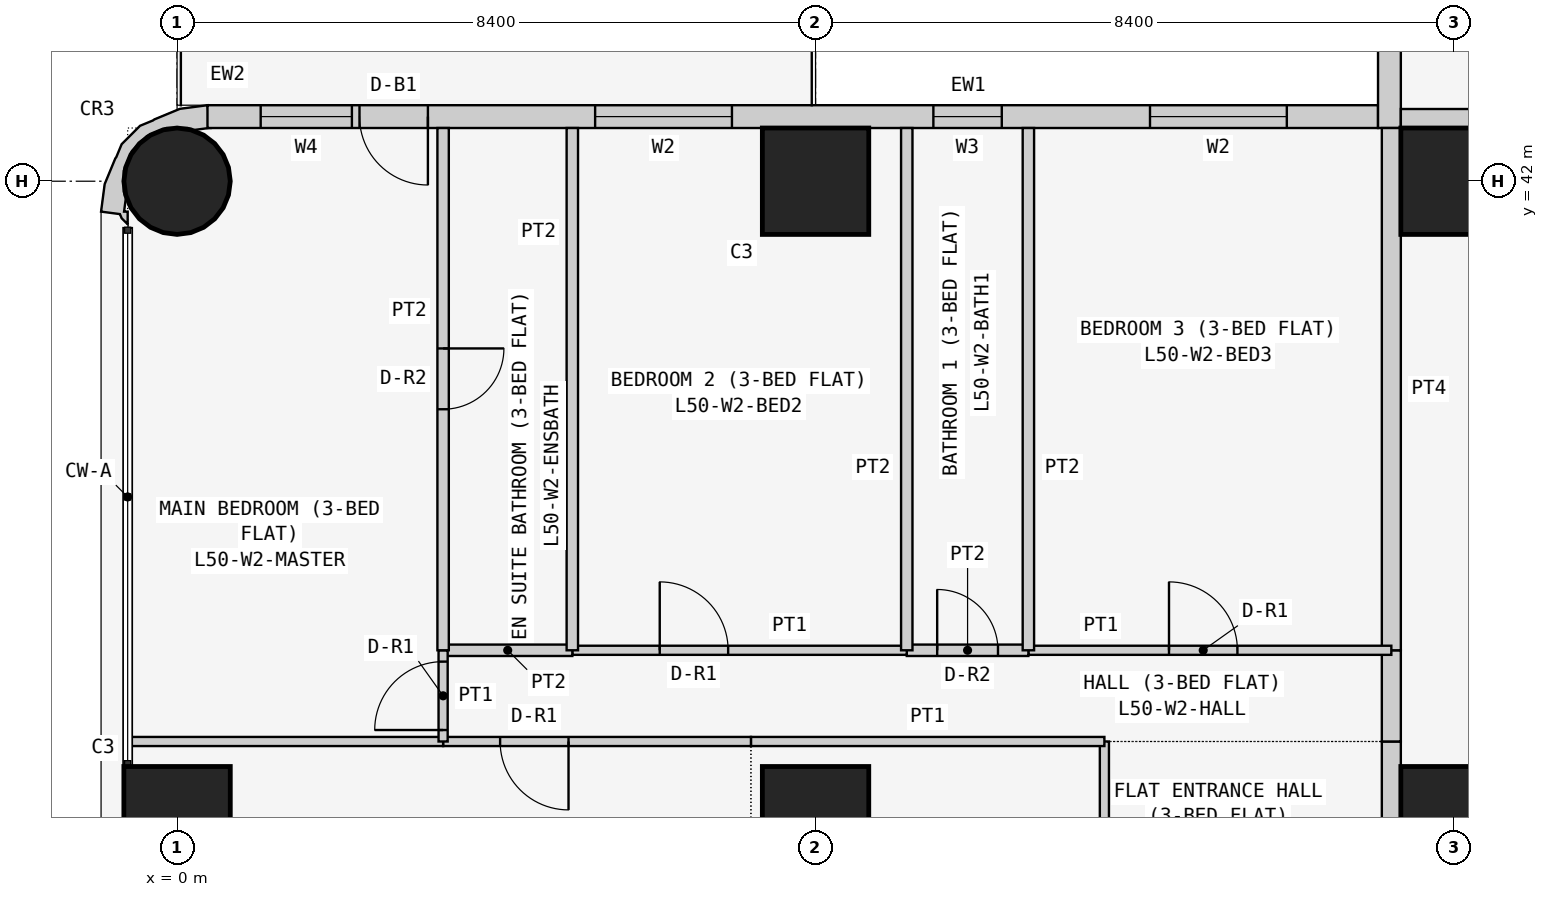
"""IFC4 building model, lengths in metres.
Left out: names, types, materials, properties, quantities, classifications, styles, units other than length and angle.
Written with IfcOpenShell. Run it as: python <this file> out.ifc"""

import sys

from ifc_helpers import new_model, si_unit, direction, frame, frame_2d, origin, origin_2d, place, context, subcontext, project, spatial, polyline, rectangle, circle, outline, extrude, element, fill, save


model = new_model("IFC4")
c1 = context("Model", 3, precision=1e-05, world=origin(), true_north=direction((0.0, 1.0)))
c2 = subcontext(c1, "Body", "Model", "MODEL_VIEW")
j1 = project(units=[si_unit("LENGTHUNIT", "METRE"), si_unit("PLANEANGLEUNIT", "RADIAN")], contexts=[c1])
p1 = place(None, origin())
s1 = spatial("IfcSite", under=j1, at=p1, CompositionType="ELEMENT")
p2 = place(p1, origin())
s2 = spatial("IfcBuilding", under=s1, at=p2, CompositionType="ELEMENT")
p3 = place(p2, frame((0.0, 0.0, 194.1)))
s3 = spatial("IfcBuildingStorey", under=s2, at=p3, CompositionType="ELEMENT", Elevation=194.1)
p4 = place(p3, frame((0.0, 33.6, 0.0), z_axis=(0.0, 0.0, 1.0), x_axis=(1.0, 0.0, 0.0)))
e1 = element("IfcColumn", 1, at=p4, inside=s3, PredefinedType="COLUMN", context=c2, shape_type="SweptSolid", body=[
    extrude(rectangle(XDim=1.4, YDim=1.4, at=origin_2d()), origin(), (0.0, 0.0, 1.0), 3.6),
])
p5 = place(p3, frame((0.0, 42.0, 0.0), z_axis=(0.0, 0.0, 1.0), x_axis=(1.0, 0.0, 0.0)))
e2 = element("IfcColumn", 2, at=p5, inside=s3, PredefinedType="COLUMN", context=c2, shape_type="SweptSolid", body=[
    extrude(circle(Radius=0.7, at=origin_2d()), origin(), (0.0, 0.0, 1.0), 3.6),
])
for number, where, z_axis, x_axis in (
    (3, (8.4, 33.6, 0.0), (0.0, 0.0, 1.0), (1.0, 0.0, 0.0)),
    (4, (8.4, 42.0, 0.0), (0.0, 0.0, 1.0), (1.0, 0.0, 0.0)),
    (5, (16.8, 33.6, 0.0), (0.0, 0.0, 1.0), (1.0, 0.0, 0.0)),
    (6, (16.8, 42.0, 0.0), (0.0, 0.0, 1.0), (1.0, 0.0, 0.0)),
):
    element("IfcColumn", number, at=place(p3, frame(where, z_axis=z_axis, x_axis=x_axis)), inside=s3, PredefinedType="COLUMN", context=c2, shape_type="SweptSolid", body=[
        extrude(rectangle(XDim=1.4, YDim=1.4, at=origin_2d()), origin(), (0.0, 0.0, 1.0), 3.6),
    ])
p6 = place(p3, frame((15.8, 42.85, 0.0), z_axis=(0.0, 0.0, 1.0), x_axis=(-1.0, 0.0, 0.0)))
e7 = element("IfcWall", 7, at=p6, inside=s3, PredefinedType="SOLIDWALL", context=c2, shape_type="SweptSolid", body=[
    extrude(rectangle(XDim=15.4, YDim=0.3, at=frame_2d((7.7, 0.0))), origin(), (0.0, 0.0, 1.0), 3.45),
])
p7 = place(p6, frame((1.2, 0.0, 0.9)))
e8 = element("IfcOpeningElement", 8, at=p7, cuts=e7, PredefinedType="OPENING", context=c2, shape_type="SweptSolid", body=[
    extrude(rectangle(XDim=1.8, YDim=1.5, at=frame_2d((0.9, 0.75))), frame((0.0, 0.16, 0.0), z_axis=(0.0, -1.0, 0.0), x_axis=(1.0, 0.0, 0.0)), (0.0, 0.0, 1.0), 0.32),
])
p8 = place(p6, frame((4.95, 0.0, 1.5)))
e9 = element("IfcOpeningElement", 9, at=p8, cuts=e7, PredefinedType="OPENING", context=c2, shape_type="SweptSolid", body=[
    extrude(rectangle(XDim=0.9, YDim=0.7, at=frame_2d((0.45, 0.35))), frame((0.0, 0.16, 0.0), z_axis=(0.0, -1.0, 0.0), x_axis=(1.0, 0.0, 0.0)), (0.0, 0.0, 1.0), 0.32),
])
p9 = place(p6, frame((8.5, 0.0, 0.9)))
e10 = element("IfcOpeningElement", 10, at=p9, cuts=e7, PredefinedType="OPENING", context=c2, shape_type="SweptSolid", body=[
    extrude(rectangle(XDim=1.8, YDim=1.5, at=frame_2d((0.9, 0.75))), frame((0.0, 0.16, 0.0), z_axis=(0.0, -1.0, 0.0), x_axis=(1.0, 0.0, 0.0)), (0.0, 0.0, 1.0), 0.32),
])
p10 = place(p6, frame((12.5, 0.0, 0.0)))
e11 = element("IfcOpeningElement", 11, at=p10, cuts=e7, PredefinedType="OPENING", context=c2, shape_type="SweptSolid", body=[
    extrude(rectangle(XDim=0.9, YDim=2.4, at=frame_2d((0.45, 1.2))), frame((0.0, 0.16, 0.0), z_axis=(0.0, -1.0, 0.0), x_axis=(1.0, 0.0, 0.0)), (0.0, 0.0, 1.0), 0.32),
])
p11 = place(p6, frame((13.5, 0.0, 0.9)))
e12 = element("IfcOpeningElement", 12, at=p11, cuts=e7, PredefinedType="OPENING", context=c2, shape_type="SweptSolid", body=[
    extrude(rectangle(XDim=1.2, YDim=1.5, at=frame_2d((0.6, 0.75))), frame((0.0, 0.16, 0.0), z_axis=(0.0, -1.0, 0.0), x_axis=(1.0, 0.0, 0.0)), (0.0, 0.0, 1.0), 0.32),
])
p12 = place(p3, frame((15.95, 50.0, 0.0), z_axis=(0.0, 0.0, 1.0), x_axis=(0.0, -1.0, 0.0)))
e13 = element("IfcWall", 13, at=p12, inside=s3, PredefinedType="SOLIDWALL", context=c2, shape_type="SweptSolid", body=[
    extrude(rectangle(XDim=7.3, YDim=0.3, at=frame_2d((3.65, 0.0))), origin(), (0.0, 0.0, 1.0), 3.45),
])
p13 = place(p12, frame((3.1, 0.0, 0.9)))
e14 = element("IfcOpeningElement", 14, at=p13, cuts=e13, PredefinedType="OPENING", context=c2, shape_type="SweptSolid", body=[
    extrude(rectangle(XDim=2.4, YDim=1.5, at=frame_2d((1.2, 0.75))), frame((0.0, 0.16, 0.0), z_axis=(0.0, -1.0, 0.0), x_axis=(1.0, 0.0, 0.0)), (0.0, 0.0, 1.0), 0.32),
])
p14 = place(p12, frame((0.75, 0.0, 0.9)))
e15 = element("IfcOpeningElement", 15, at=p14, cuts=e13, PredefinedType="OPENING", context=c2, shape_type="SweptSolid", body=[
    extrude(rectangle(XDim=1.2, YDim=1.5, at=frame_2d((0.6, 0.75))), frame((0.0, 0.16, 0.0), z_axis=(0.0, -1.0, 0.0), x_axis=(1.0, 0.0, 0.0)), (0.0, 0.0, 1.0), 0.32),
])
p15 = place(p3, frame((0.29, 42.724, 0.0), z_axis=(0.0, 0.0, 1.0), x_axis=(-0.898030234854, 0.439933741929, 0.0)))
e16 = element("IfcWall", 16, at=p15, inside=s3, PredefinedType="SOLIDWALL", context=c2, shape_type="SweptSolid", body=[
    extrude(outline(polyline([(-0.145, -0.044), (0.022, -0.296), (0.327, -0.094), (0.568, 0.18), (0.578, 0.199), (0.7, 0.338), (0.811, 0.661), (0.799, 0.846), (0.803, 0.866), (0.78, 1.231), (0.664, 1.577), (0.426, 1.497), (0.382, 1.536), (0.276, 1.572), (0.349, 1.423), (0.392, 1.444), (0.453, 1.261), (0.51, 1.211), (0.632, 0.961), (0.65, 0.683), (0.56, 0.419), (0.375, 0.21), (0.125, 0.087), (0.05, 0.082), (-0.127, -0.035), (-0.145, -0.044)])), origin(), (0.0, 0.0, 1.0), 3.45),
])
p16 = place(p3, frame((16.1, 42.825, 0.0), z_axis=(0.0, 0.0, 1.0), x_axis=(1.0, 0.0, 0.0)))
e17 = element("IfcWall", 17, at=p16, inside=s3, PredefinedType="PARTITIONING", context=c2, shape_type="SweptSolid", body=[
    extrude(rectangle(XDim=6.871, YDim=0.25, at=frame_2d((3.436, 0.0))), origin(), (0.0, 0.0, 1.0), 3.45),
])
p17 = place(p3, frame((15.975, 29.4, 0.0), z_axis=(0.0, 0.0, 1.0), x_axis=(0.0, 1.0, 0.0)))
e18 = element("IfcWall", 18, at=p17, inside=s3, PredefinedType="PARTITIONING", context=c2, shape_type="SweptSolid", body=[
    extrude(rectangle(XDim=5.229, YDim=0.25, at=frame_2d((2.615, 0.0))), origin(), (0.0, 0.0, 1.0), 3.45),
])
p18 = place(p17, frame((2.1, 0.0, 0.0)))
e19 = element("IfcOpeningElement", 19, at=p18, cuts=e18, PredefinedType="OPENING", context=c2, shape_type="SweptSolid", body=[
    extrude(rectangle(XDim=1.0, YDim=2.1, at=frame_2d((0.5, 1.05))), frame((0.0, 0.135, 0.0), z_axis=(0.0, -1.0, 0.0), x_axis=(1.0, 0.0, 0.0)), (0.0, 0.0, 1.0), 0.27),
])
p19 = place(p3, frame((15.975, 34.629, 0.0), z_axis=(0.0, 0.0, 1.0), x_axis=(0.0, 1.0, 0.0)))
e20 = element("IfcWall", 20, at=p19, inside=s3, PredefinedType="PARTITIONING", context=c2, shape_type="SweptSolid", body=[
    extrude(rectangle(XDim=1.2, YDim=0.25, at=frame_2d((0.6, 0.0))), origin(), (0.0, 0.0, 1.0), 3.45),
])
p20 = place(p3, frame((15.975, 35.829, 0.0), z_axis=(0.0, 0.0, 1.0), x_axis=(0.0, 1.0, 0.0)))
e21 = element("IfcWall", 21, at=p20, inside=s3, PredefinedType="PARTITIONING", context=c2, shape_type="SweptSolid", body=[
    extrude(rectangle(XDim=6.871, YDim=0.25, at=frame_2d((3.436, 0.0))), origin(), (0.0, 0.0, 1.0), 3.45),
])
p21 = place(p3, frame((12.2, 29.4, 0.0), z_axis=(0.0, 0.0, 1.0), x_axis=(0.0, 1.0, 0.0)))
e22 = element("IfcWall", 22, at=p21, inside=s3, PredefinedType="PARTITIONING", context=c2, shape_type="SweptSolid", body=[
    extrude(rectangle(XDim=5.229, YDim=0.12, at=frame_2d((2.615, 0.0))), origin(), (0.0, 0.0, 1.0), 3.45),
])
p22 = place(p21, frame((1.05, 0.0, 0.0)))
e23 = element("IfcOpeningElement", 23, at=p22, cuts=e22, PredefinedType="OPENING", context=c2, shape_type="SweptSolid", body=[
    extrude(rectangle(XDim=0.9, YDim=2.1, at=frame_2d((0.45, 1.05))), frame((0.0, 0.07, 0.0), z_axis=(0.0, -1.0, 0.0), x_axis=(1.0, 0.0, 0.0)), (0.0, 0.0, 1.0), 0.14),
])
p23 = place(p3, frame((7.55, 34.629, 0.0), z_axis=(0.0, 0.0, 1.0), x_axis=(1.0, 0.0, 0.0)))
e24 = element("IfcWall", 24, at=p23, inside=s3, PredefinedType="PARTITIONING", context=c2, shape_type="SweptSolid", body=[
    extrude(rectangle(XDim=4.65, YDim=0.12, at=frame_2d((2.325, 0.0))), origin(), (0.0, 0.0, 1.0), 3.45),
])
p24 = place(p3, frame((3.5, 34.629, 0.0), z_axis=(0.0, 0.0, 1.0), x_axis=(1.0, 0.0, 0.0)))
e25 = element("IfcWall", 25, at=p24, inside=s3, PredefinedType="PARTITIONING", context=c2, shape_type="SweptSolid", body=[
    extrude(rectangle(XDim=4.05, YDim=0.12, at=frame_2d((2.025, 0.0))), origin(), (0.0, 0.0, 1.0), 3.45),
])
p25 = place(p24, frame((0.75, 0.0, 0.0)))
e26 = element("IfcOpeningElement", 26, at=p25, cuts=e25, PredefinedType="OPENING", context=c2, shape_type="SweptSolid", body=[
    extrude(rectangle(XDim=0.9, YDim=2.1, at=frame_2d((0.45, 1.05))), frame((0.0, 0.07, 0.0), z_axis=(0.0, -1.0, 0.0), x_axis=(1.0, 0.0, 0.0)), (0.0, 0.0, 1.0), 0.14),
])
p26 = place(p3, frame((-0.65, 34.629, 0.0), z_axis=(0.0, 0.0, 1.0), x_axis=(1.0, 0.0, 0.0)))
e27 = element("IfcWall", 27, at=p26, inside=s3, PredefinedType="PARTITIONING", context=c2, shape_type="SweptSolid", body=[
    extrude(rectangle(XDim=4.15, YDim=0.12, at=frame_2d((2.075, 0.0))), origin(), (0.0, 0.0, 1.0), 3.45),
])
p27 = place(p3, frame((11.2, 35.829, 0.0), z_axis=(0.0, 0.0, 1.0), x_axis=(1.0, 0.0, 0.0)))
e28 = element("IfcWall", 28, at=p27, inside=s3, PredefinedType="PARTITIONING", context=c2, shape_type="SweptSolid", body=[
    extrude(rectangle(XDim=4.775, YDim=0.12, at=frame_2d((2.388, 0.0))), origin(), (0.0, 0.0, 1.0), 3.45),
])
p28 = place(p27, frame((1.85, 0.0, 0.0)))
e29 = element("IfcOpeningElement", 29, at=p28, cuts=e28, PredefinedType="OPENING", context=c2, shape_type="SweptSolid", body=[
    extrude(rectangle(XDim=0.9, YDim=2.1, at=frame_2d((0.45, 1.05))), frame((0.0, 0.07, 0.0), z_axis=(0.0, -1.0, 0.0), x_axis=(1.0, 0.0, 0.0)), (0.0, 0.0, 1.0), 0.14),
])
p29 = place(p3, frame((9.6, 35.829, 0.0), z_axis=(0.0, 0.0, 1.0), x_axis=(1.0, 0.0, 0.0)))
e30 = element("IfcWall", 30, at=p29, inside=s3, PredefinedType="PARTITIONING", context=c2, shape_type="SweptSolid", body=[
    extrude(rectangle(XDim=1.6, YDim=0.15, at=frame_2d((0.8, 0.0))), origin(), (0.0, 0.0, 1.0), 3.45),
])
p30 = place(p29, frame((0.4, 0.0, 0.0)))
e31 = element("IfcOpeningElement", 31, at=p30, cuts=e30, PredefinedType="OPENING", context=c2, shape_type="SweptSolid", body=[
    extrude(rectangle(XDim=0.8, YDim=2.1, at=frame_2d((0.4, 1.05))), frame((0.0, 0.085, 0.0), z_axis=(0.0, -1.0, 0.0), x_axis=(1.0, 0.0, 0.0)), (0.0, 0.0, 1.0), 0.17),
])
p31 = place(p3, frame((5.2, 35.829, 0.0), z_axis=(0.0, 0.0, 1.0), x_axis=(1.0, 0.0, 0.0)))
e32 = element("IfcWall", 32, at=p31, inside=s3, PredefinedType="PARTITIONING", context=c2, shape_type="SweptSolid", body=[
    extrude(rectangle(XDim=4.4, YDim=0.12, at=frame_2d((2.2, 0.0))), origin(), (0.0, 0.0, 1.0), 3.45),
])
p32 = place(p31, frame((1.15, 0.0, 0.0)))
e33 = element("IfcOpeningElement", 33, at=p32, cuts=e32, PredefinedType="OPENING", context=c2, shape_type="SweptSolid", body=[
    extrude(rectangle(XDim=0.9, YDim=2.1, at=frame_2d((0.45, 1.05))), frame((0.0, 0.07, 0.0), z_axis=(0.0, -1.0, 0.0), x_axis=(1.0, 0.0, 0.0)), (0.0, 0.0, 1.0), 0.14),
])
p33 = place(p3, frame((3.5, 35.829, 0.0), z_axis=(0.0, 0.0, 1.0), x_axis=(1.0, 0.0, 0.0)))
e34 = element("IfcWall", 34, at=p33, inside=s3, PredefinedType="PARTITIONING", context=c2, shape_type="SweptSolid", body=[
    extrude(rectangle(XDim=1.7, YDim=0.15, at=frame_2d((0.85, 0.0))), origin(), (0.0, 0.0, 1.0), 3.45),
])
p34 = place(p3, frame((3.5, 34.629, 0.0), z_axis=(0.0, 0.0, 1.0), x_axis=(0.0, 1.0, 0.0)))
e35 = element("IfcWall", 35, at=p34, inside=s3, PredefinedType="PARTITIONING", context=c2, shape_type="SweptSolid", body=[
    extrude(rectangle(XDim=1.2, YDim=0.12, at=frame_2d((0.6, 0.0))), origin(), (0.0, 0.0, 1.0), 3.45),
])
p35 = place(p34, frame((0.151, 0.0, 0.0)))
e36 = element("IfcOpeningElement", 36, at=p35, cuts=e35, PredefinedType="OPENING", context=c2, shape_type="SweptSolid", body=[
    extrude(rectangle(XDim=0.9, YDim=2.1, at=frame_2d((0.45, 1.05))), frame((0.0, 0.07, 0.0), z_axis=(0.0, -1.0, 0.0), x_axis=(1.0, 0.0, 0.0)), (0.0, 0.0, 1.0), 0.14),
])
for number, where, z_axis, x_axis in (
    (37, (11.2, 35.829, 0.0), (0.0, 0.0, 1.0), (0.0, 1.0, 0.0)),
    (38, (9.6, 35.829, 0.0), (0.0, 0.0, 1.0), (0.0, 1.0, 0.0)),
    (39, (5.2, 35.829, 0.0), (0.0, 0.0, 1.0), (0.0, 1.0, 0.0)),
):
    element("IfcWall", number, at=place(p3, frame(where, z_axis=z_axis, x_axis=x_axis)), inside=s3, PredefinedType="PARTITIONING", context=c2, shape_type="SweptSolid", body=[
        extrude(rectangle(XDim=6.871, YDim=0.15, at=frame_2d((3.436, 0.0))), origin(), (0.0, 0.0, 1.0), 3.45),
    ])
p36 = place(p3, frame((3.5, 35.829, 0.0), z_axis=(0.0, 0.0, 1.0), x_axis=(0.0, 1.0, 0.0)))
e40 = element("IfcWall", 40, at=p36, inside=s3, PredefinedType="PARTITIONING", context=c2, shape_type="SweptSolid", body=[
    extrude(rectangle(XDim=6.871, YDim=0.15, at=frame_2d((3.436, 0.0))), origin(), (0.0, 0.0, 1.0), 3.45),
])
p37 = place(p36, frame((3.171, 0.0, 0.0)))
e41 = element("IfcOpeningElement", 41, at=p37, cuts=e40, PredefinedType="OPENING", context=c2, shape_type="SweptSolid", body=[
    extrude(rectangle(XDim=0.8, YDim=2.1, at=frame_2d((0.4, 1.05))), frame((0.0, 0.085, 0.0), z_axis=(0.0, -1.0, 0.0), x_axis=(1.0, 0.0, 0.0)), (0.0, 0.0, 1.0), 0.17),
])
p38 = place(p7, origin())
e42 = element("IfcWindow", 42, at=p38, inside=s3, PartitioningType="SINGLE_PANEL", PredefinedType="WINDOW", context=c2, shape_type="SweptSolid", body=[
    extrude(rectangle(XDim=1.8, YDim=1.5, at=frame_2d((0.9, 0.75))), frame((0.0, 0.03, 0.0), z_axis=(0.0, -1.0, 0.0), x_axis=(1.0, 0.0, 0.0)), (0.0, 0.0, 1.0), 0.06),
])
fill(e8, e42)
p39 = place(p8, origin())
e43 = element("IfcWindow", 43, at=p39, inside=s3, PartitioningType="SINGLE_PANEL", PredefinedType="WINDOW", context=c2, shape_type="SweptSolid", body=[
    extrude(rectangle(XDim=0.9, YDim=0.7, at=frame_2d((0.45, 0.35))), frame((0.0, 0.03, 0.0), z_axis=(0.0, -1.0, 0.0), x_axis=(1.0, 0.0, 0.0)), (0.0, 0.0, 1.0), 0.06),
])
fill(e9, e43)
p40 = place(p9, origin())
e44 = element("IfcWindow", 44, at=p40, inside=s3, PartitioningType="SINGLE_PANEL", PredefinedType="WINDOW", context=c2, shape_type="SweptSolid", body=[
    extrude(rectangle(XDim=1.8, YDim=1.5, at=frame_2d((0.9, 0.75))), frame((0.0, 0.03, 0.0), z_axis=(0.0, -1.0, 0.0), x_axis=(1.0, 0.0, 0.0)), (0.0, 0.0, 1.0), 0.06),
])
fill(e10, e44)
p41 = place(p10, origin())
e45 = element("IfcDoor", 45, at=p41, inside=s3, OperationType="SINGLE_SWING_LEFT", PredefinedType="DOOR", context=c2, shape_type="SweptSolid", body=[
    extrude(rectangle(XDim=0.9, YDim=2.4, at=frame_2d((0.45, 1.2))), frame((0.0, 0.025, 0.0), z_axis=(0.0, -1.0, 0.0), x_axis=(1.0, 0.0, 0.0)), (0.0, 0.0, 1.0), 0.05),
])
fill(e11, e45)
p42 = place(p11, origin())
e46 = element("IfcWindow", 46, at=p42, inside=s3, PartitioningType="SINGLE_PANEL", PredefinedType="WINDOW", context=c2, shape_type="SweptSolid", body=[
    extrude(rectangle(XDim=1.2, YDim=1.5, at=frame_2d((0.6, 0.75))), frame((0.0, 0.03, 0.0), z_axis=(0.0, -1.0, 0.0), x_axis=(1.0, 0.0, 0.0)), (0.0, 0.0, 1.0), 0.06),
])
fill(e12, e46)
p43 = place(p25, frame((0.9, 0.0, 0.0), z_axis=(0.0, 0.0, 1.0), x_axis=(-1.0, 0.0, 0.0)))
e47 = element("IfcDoor", 47, at=p43, inside=s3, OperationType="SINGLE_SWING_LEFT", PredefinedType="DOOR", context=c2, shape_type="SweptSolid", body=[
    extrude(rectangle(XDim=0.9, YDim=2.1, at=frame_2d((0.45, 1.05))), frame((0.0, 0.025, 0.0), z_axis=(0.0, -1.0, 0.0), x_axis=(1.0, 0.0, 0.0)), (0.0, 0.0, 1.0), 0.05),
])
fill(e26, e47)
p44 = place(p28, origin())
e48 = element("IfcDoor", 48, at=p44, inside=s3, OperationType="SINGLE_SWING_LEFT", PredefinedType="DOOR", context=c2, shape_type="SweptSolid", body=[
    extrude(rectangle(XDim=0.9, YDim=2.1, at=frame_2d((0.45, 1.05))), frame((0.0, 0.025, 0.0), z_axis=(0.0, -1.0, 0.0), x_axis=(1.0, 0.0, 0.0)), (0.0, 0.0, 1.0), 0.05),
])
fill(e29, e48)
p45 = place(p30, origin())
e49 = element("IfcDoor", 49, at=p45, inside=s3, OperationType="SINGLE_SWING_LEFT", PredefinedType="DOOR", context=c2, shape_type="SweptSolid", body=[
    extrude(rectangle(XDim=0.8, YDim=2.1, at=frame_2d((0.4, 1.05))), frame((0.0, 0.025, 0.0), z_axis=(0.0, -1.0, 0.0), x_axis=(1.0, 0.0, 0.0)), (0.0, 0.0, 1.0), 0.05),
])
fill(e31, e49)
p46 = place(p32, origin())
e50 = element("IfcDoor", 50, at=p46, inside=s3, OperationType="SINGLE_SWING_LEFT", PredefinedType="DOOR", context=c2, shape_type="SweptSolid", body=[
    extrude(rectangle(XDim=0.9, YDim=2.1, at=frame_2d((0.45, 1.05))), frame((0.0, 0.025, 0.0), z_axis=(0.0, -1.0, 0.0), x_axis=(1.0, 0.0, 0.0)), (0.0, 0.0, 1.0), 0.05),
])
fill(e33, e50)
p47 = place(p35, origin())
e51 = element("IfcDoor", 51, at=p47, inside=s3, OperationType="SINGLE_SWING_LEFT", PredefinedType="DOOR", context=c2, shape_type="SweptSolid", body=[
    extrude(rectangle(XDim=0.9, YDim=2.1, at=frame_2d((0.45, 1.05))), frame((0.0, 0.025, 0.0), z_axis=(0.0, -1.0, 0.0), x_axis=(1.0, 0.0, 0.0)), (0.0, 0.0, 1.0), 0.05),
])
fill(e36, e51)
p48 = place(p37, frame((0.8, 0.0, 0.0), z_axis=(0.0, 0.0, 1.0), x_axis=(-1.0, 0.0, 0.0)))
e52 = element("IfcDoor", 52, at=p48, inside=s3, OperationType="SINGLE_SWING_LEFT", PredefinedType="DOOR", context=c2, shape_type="SweptSolid", body=[
    extrude(rectangle(XDim=0.8, YDim=2.1, at=frame_2d((0.4, 1.05))), frame((0.0, 0.025, 0.0), z_axis=(0.0, -1.0, 0.0), x_axis=(1.0, 0.0, 0.0)), (0.0, 0.0, 1.0), 0.05),
])
fill(e41, e52)
save(model, sys.argv[1])
